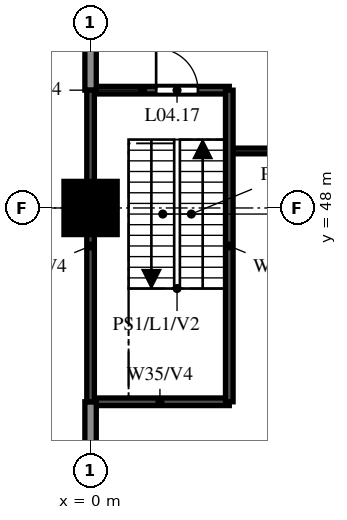
"""IFC4 building model, lengths in metres.
Left out: names, types, materials, properties, quantities, classifications, styles, units other than length and angle.
Written with IfcOpenShell. Run it as: python <this file> out.ifc"""

import sys

from ifc_helpers import new_model, si_unit, direction, frame, frame_2d, origin, origin_2d, place, context, subcontext, project, spatial, rectangle, circle, extrude, source, transform, mapped, element, fill, save


model = new_model("IFC4")
c1 = context("Model", 3, precision=1e-05, world=origin(), true_north=direction((0.0, 1.0)))
c2 = subcontext(c1, "Body", "Model", "MODEL_VIEW")
j1 = project(units=[si_unit("LENGTHUNIT", "METRE"), si_unit("PLANEANGLEUNIT", "RADIAN")], contexts=[c1])
p1 = place(None, origin())
s1 = spatial("IfcSite", under=j1, at=p1, CompositionType="ELEMENT")
p2 = place(p1, origin())
s2 = spatial("IfcBuilding", under=s1, at=p2, CompositionType="ELEMENT")
p3 = place(p2, frame((0.0, 0.0, 21.6)))
s3 = spatial("IfcBuildingStorey", under=s2, at=p3, CompositionType="ELEMENT", Elevation=21.6)
m1 = source(origin(), c2, "Body", "SweptSolid", [
    extrude(circle(Radius=0.7, at=origin_2d()), origin(), (0.0, 0.0, 1.0), 4.95),
])
p4 = place(p3, frame((0.0, 48.0, 0.0), z_axis=(0.0, 0.0, 1.0), x_axis=(1.0, 0.0, 0.0)))
e1 = element("IfcColumn", 1, at=p4, inside=s3, PredefinedType="COLUMN", context=c2, shape_type="MappedRepresentation", body=[
    mapped(m1, transform((0.0, 0.0, 0.0))),
])
p5 = place(p3, frame((0.0, 42.9, 0.0), z_axis=(0.0, 0.0, 1.0), x_axis=(1.0, 0.0, 0.0)))
e2 = element("IfcWall", 2, at=p5, inside=s3, PredefinedType="SOLIDWALL", context=c2, shape_type="SweptSolid", body=[
    extrude(rectangle(XDim=3.65, YDim=0.2, at=frame_2d((1.825, 0.0))), origin(), (0.0, 0.0, 1.0), 4.95),
])
p6 = place(p3, frame((3.75, 49.5, 0.0), z_axis=(0.0, 0.0, 1.0), x_axis=(1.0, 0.0, 0.0)))
e3 = element("IfcWall", 3, at=p6, inside=s3, PredefinedType="PARTITIONING", context=c2, shape_type="SweptSolid", body=[
    extrude(rectangle(XDim=93.3, YDim=0.15, at=frame_2d((46.65, 0.0))), origin(), (0.0, 0.0, 1.0), 3.45),
])
p7 = place(p6, frame((15.175, 0.0, 0.0)))
e4 = element("IfcOpeningElement", 4, at=p7, cuts=e3, PredefinedType="OPENING", context=c2, shape_type="SweptSolid", body=[
    extrude(rectangle(XDim=1.8, YDim=2.1, at=frame_2d((0.9, 1.05))), frame((0.0, 0.085, 0.0), z_axis=(0.0, -1.0, 0.0), x_axis=(1.0, 0.0, 0.0)), (0.0, 0.0, 1.0), 0.17),
])
p8 = place(p6, frame((4.823, 0.0, 0.0)))
e5 = element("IfcOpeningElement", 5, at=p8, cuts=e3, PredefinedType="OPENING", context=c2, shape_type="SweptSolid", body=[
    extrude(rectangle(XDim=1.8, YDim=2.1, at=frame_2d((0.9, 1.05))), frame((0.0, 0.085, 0.0), z_axis=(0.0, -1.0, 0.0), x_axis=(1.0, 0.0, 0.0)), (0.0, 0.0, 1.0), 0.17),
])
p9 = place(p6, frame((44.05, 0.0, 0.0)))
e6 = element("IfcOpeningElement", 6, at=p9, cuts=e3, PredefinedType="OPENING", context=c2, shape_type="SweptSolid", body=[
    extrude(rectangle(XDim=1.8, YDim=2.1, at=frame_2d((0.9, 1.05))), frame((0.0, 0.085, 0.0), z_axis=(0.0, -1.0, 0.0), x_axis=(1.0, 0.0, 0.0)), (0.0, 0.0, 1.0), 0.17),
])
p10 = place(p6, frame((36.534, 0.0, 0.0)))
e7 = element("IfcOpeningElement", 7, at=p10, cuts=e3, PredefinedType="OPENING", context=c2, shape_type="SweptSolid", body=[
    extrude(rectangle(XDim=1.8, YDim=2.1, at=frame_2d((0.9, 1.05))), frame((0.0, 0.085, 0.0), z_axis=(0.0, -1.0, 0.0), x_axis=(1.0, 0.0, 0.0)), (0.0, 0.0, 1.0), 0.17),
])
p11 = place(p6, frame((76.325, 0.0, 0.0)))
e8 = element("IfcOpeningElement", 8, at=p11, cuts=e3, PredefinedType="OPENING", context=c2, shape_type="SweptSolid", body=[
    extrude(rectangle(XDim=1.8, YDim=2.1, at=frame_2d((0.9, 1.05))), frame((0.0, 0.085, 0.0), z_axis=(0.0, -1.0, 0.0), x_axis=(1.0, 0.0, 0.0)), (0.0, 0.0, 1.0), 0.17),
])
p12 = place(p6, frame((65.623, 0.0, 0.0)))
e9 = element("IfcOpeningElement", 9, at=p12, cuts=e3, PredefinedType="OPENING", context=c2, shape_type="SweptSolid", body=[
    extrude(rectangle(XDim=1.8, YDim=2.1, at=frame_2d((0.9, 1.05))), frame((0.0, 0.085, 0.0), z_axis=(0.0, -1.0, 0.0), x_axis=(1.0, 0.0, 0.0)), (0.0, 0.0, 1.0), 0.17),
])
p13 = place(p3, frame((0.0, 51.1, 0.0), z_axis=(0.0, 0.0, 1.0), x_axis=(1.0, 0.0, 0.0)))
e10 = element("IfcWall", 10, at=p13, inside=s3, PredefinedType="SOLIDWALL", context=c2, shape_type="SweptSolid", body=[
    extrude(rectangle(XDim=3.65, YDim=0.2, at=frame_2d((1.825, 0.0))), origin(), (0.0, 0.0, 1.0), 4.95),
])
p14 = place(p13, frame((1.725, 0.0, 0.0)))
e11 = element("IfcOpeningElement", 11, at=p14, cuts=e10, PredefinedType="OPENING", context=c2, shape_type="SweptSolid", body=[
    extrude(rectangle(XDim=1.1, YDim=2.1, at=frame_2d((0.55, 1.05))), frame((0.0, 0.11, 0.0), z_axis=(0.0, -1.0, 0.0), x_axis=(1.0, 0.0, 0.0)), (0.0, 0.0, 1.0), 0.22),
])
p15 = place(p3, frame((0.0, 19.2, 0.0), z_axis=(0.0, 0.0, 1.0), x_axis=(0.0, 1.0, 0.0)))
e12 = element("IfcWall", 12, at=p15, inside=s3, PredefinedType="SOLIDWALL", context=c2, shape_type="SweptSolid", body=[
    extrude(rectangle(XDim=23.7, YDim=0.3, at=frame_2d((11.85, 0.0))), origin(), (0.0, 0.0, 1.0), 4.95),
])
p16 = place(p15, frame((1.65, 0.0, 0.6)))
e13 = element("IfcOpeningElement", 13, at=p16, cuts=e12, PredefinedType="OPENING", context=c2, shape_type="SweptSolid", body=[
    extrude(rectangle(XDim=1.8, YDim=2.4, at=frame_2d((0.9, 1.2))), frame((0.0, 0.16, 0.0), z_axis=(0.0, -1.0, 0.0), x_axis=(1.0, 0.0, 0.0)), (0.0, 0.0, 1.0), 0.32),
])
p17 = place(p15, frame((5.25, 0.0, 0.6)))
e14 = element("IfcOpeningElement", 14, at=p17, cuts=e12, PredefinedType="OPENING", context=c2, shape_type="SweptSolid", body=[
    extrude(rectangle(XDim=1.8, YDim=2.4, at=frame_2d((0.9, 1.2))), frame((0.0, 0.16, 0.0), z_axis=(0.0, -1.0, 0.0), x_axis=(1.0, 0.0, 0.0)), (0.0, 0.0, 1.0), 0.32),
])
p18 = place(p15, frame((8.85, 0.0, 0.6)))
e15 = element("IfcOpeningElement", 15, at=p18, cuts=e12, PredefinedType="OPENING", context=c2, shape_type="SweptSolid", body=[
    extrude(rectangle(XDim=1.8, YDim=2.4, at=frame_2d((0.9, 1.2))), frame((0.0, 0.16, 0.0), z_axis=(0.0, -1.0, 0.0), x_axis=(1.0, 0.0, 0.0)), (0.0, 0.0, 1.0), 0.32),
])
p19 = place(p15, frame((16.05, 0.0, 0.6)))
e16 = element("IfcOpeningElement", 16, at=p19, cuts=e12, PredefinedType="OPENING", context=c2, shape_type="SweptSolid", body=[
    extrude(rectangle(XDim=1.8, YDim=2.4, at=frame_2d((0.9, 1.2))), frame((0.0, 0.16, 0.0), z_axis=(0.0, -1.0, 0.0), x_axis=(1.0, 0.0, 0.0)), (0.0, 0.0, 1.0), 0.32),
])
p20 = place(p15, frame((19.65, 0.0, 0.6)))
e17 = element("IfcOpeningElement", 17, at=p20, cuts=e12, PredefinedType="OPENING", context=c2, shape_type="SweptSolid", body=[
    extrude(rectangle(XDim=1.8, YDim=2.4, at=frame_2d((0.9, 1.2))), frame((0.0, 0.16, 0.0), z_axis=(0.0, -1.0, 0.0), x_axis=(1.0, 0.0, 0.0)), (0.0, 0.0, 1.0), 0.32),
])
p21 = place(p3, frame((0.0, 51.1, 0.0), z_axis=(0.0, 0.0, 1.0), x_axis=(0.0, 1.0, 0.0)))
e18 = element("IfcWall", 18, at=p21, inside=s3, PredefinedType="SOLIDWALL", context=c2, shape_type="SweptSolid", body=[
    extrude(rectangle(XDim=3.2, YDim=0.3, at=frame_2d((1.6, 0.0))), origin(), (0.0, 0.0, 1.0), 4.95),
])
for number, where, z_axis, x_axis in (
    (19, (0.0, 42.9, 0.0), (0.0, 0.0, 1.0), (0.0, 1.0, 0.0)),
    (20, (3.65, 42.9, 0.0), (0.0, 0.0, 1.0), (0.0, 1.0, 0.0)),
):
    element("IfcWall", number, at=place(p3, frame(where, z_axis=z_axis, x_axis=x_axis)), inside=s3, PredefinedType="SOLIDWALL", context=c2, shape_type="SweptSolid", body=[
        extrude(rectangle(XDim=8.2, YDim=0.2, at=frame_2d((4.1, 0.0))), origin(), (0.0, 0.0, 1.0), 4.95),
    ])
p22 = place(p14, origin())
e21 = element("IfcDoor", 21, at=p22, inside=s3, OperationType="SINGLE_SWING_RIGHT", PredefinedType="DOOR", context=c2, shape_type="SweptSolid", body=[
    extrude(rectangle(XDim=1.1, YDim=2.1, at=frame_2d((0.55, 1.05))), frame((0.0, 0.025, 0.0), z_axis=(0.0, -1.0, 0.0), x_axis=(1.0, 0.0, 0.0)), (0.0, 0.0, 1.0), 0.05),
])
fill(e11, e21)
save(model, sys.argv[1])
